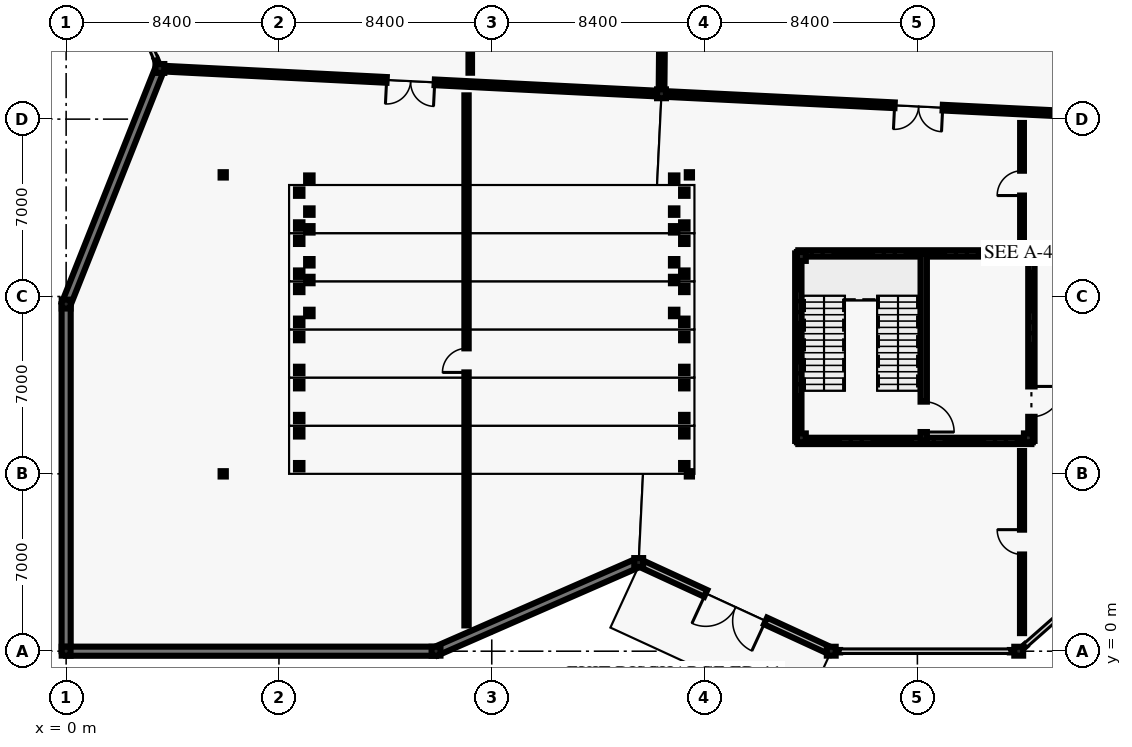
"""IFC4 building model, lengths in metres.
Left out: names, types, materials, properties, quantities, classifications, styles, units other than length and angle.
Written with IfcOpenShell. Run it as: python <this file> out.ifc"""

import sys

from ifc_helpers import new_model, si_unit, direction, frame, frame_2d, origin, origin_2d, place, context, subcontext, project, spatial, rectangle, i_section, extrude, element, fill, save


model = new_model("IFC4")
c1 = context("Model", 3, precision=1e-05, world=origin(), true_north=direction((0.0, 1.0)))
c2 = subcontext(c1, "Body", "Model", "MODEL_VIEW")
j1 = project(units=[si_unit("LENGTHUNIT", "METRE"), si_unit("PLANEANGLEUNIT", "RADIAN")], contexts=[c1])
p1 = place(None, origin())
s1 = spatial("IfcSite", under=j1, at=p1, CompositionType="ELEMENT")
p2 = place(p1, origin())
s2 = spatial("IfcBuilding", under=s1, at=p2, CompositionType="ELEMENT")
p3 = place(p2, origin())
s3 = spatial("IfcBuildingStorey", under=s2, at=p3, CompositionType="ELEMENT", Elevation=0.0)
for number, where, z_axis, x_axis in (
    (1, (0.0, 0.0, 0.0), (0.0, 0.0, 1.0), (1.0, 0.0, 0.0)),
    (2, (0.0, 13.7, 0.0), (0.0, 0.0, 1.0), (1.0, 0.0, 0.0)),
    (3, (3.7, 23.0, 0.0), (0.0, 0.0, 1.0), (1.0, 0.0, 0.0)),
    (4, (14.6, 0.0, 0.0), (0.0, 0.0, 1.0), (1.0, 0.0, 0.0)),
    (5, (22.6, 3.5, 0.0), (0.0, 0.0, 1.0), (1.0, 0.0, 0.0)),
    (6, (23.5, 22.0, 0.0), (0.0, 0.0, 1.0), (1.0, 0.0, 0.0)),
    (7, (30.2, 0.0, 0.0), (0.0, 0.0, 1.0), (1.0, 0.0, 0.0)),
    (8, (37.6, 0.0, 0.0), (0.0, 0.0, 1.0), (1.0, 0.0, 0.0)),
    (9, (29.02, 8.42, 0.0), (0.0, 0.0, 1.0), (1.0, 0.0, 0.0)),
    (10, (37.98, 8.42, 0.0), (0.0, 0.0, 1.0), (1.0, 0.0, 0.0)),
    (11, (37.98, 15.58, 0.0), (0.0, 0.0, 1.0), (1.0, 0.0, 0.0)),
    (12, (29.02, 15.58, 0.0), (0.0, 0.0, 1.0), (1.0, 0.0, 0.0)),
):
    element("IfcColumn", number, at=place(p3, frame(where, z_axis=z_axis, x_axis=x_axis)), inside=s3, PredefinedType="COLUMN", context=c2, shape_type="SweptSolid", body=[
        extrude(i_section(OverallWidth=0.35, OverallDepth=0.35, WebThickness=0.02, FlangeThickness=0.028, at=origin_2d()), origin(), (0.0, 0.0, 1.0), 5.4),
    ])
for number, where, z_axis, x_axis in (
    (13, (6.2, 7.0, 0.0), (0.0, 0.0, 1.0), (1.0, 0.0, 0.0)),
    (14, (24.6, 7.0, 0.0), (0.0, 0.0, 1.0), (1.0, 0.0, 0.0)),
    (15, (6.2, 18.8, 0.0), (0.0, 0.0, 1.0), (1.0, 0.0, 0.0)),
    (16, (24.6, 18.8, 0.0), (0.0, 0.0, 1.0), (1.0, 0.0, 0.0)),
):
    element("IfcColumn", number, at=place(p3, frame(where, z_axis=z_axis, x_axis=x_axis)), inside=s3, PredefinedType="COLUMN", context=c2, shape_type="SweptSolid", body=[
        extrude(i_section(OverallWidth=0.205, OverallDepth=0.21, WebThickness=0.009, FlangeThickness=0.014, FilletRadius=0.01, at=origin_2d()), origin(), (0.0, 0.0, 1.0), 5.4),
    ])
for number, where, z_axis, x_axis in (
    (17, (9.2, 7.3, 0.0), (0.0, 0.0, 1.0), (1.0, 0.0, 0.0)),
    (18, (9.2, 8.6, 0.0), (0.0, 0.0, 1.0), (1.0, 0.0, 0.0)),
    (19, (24.4, 7.3, 0.0), (0.0, 0.0, 1.0), (1.0, 0.0, 0.0)),
    (20, (24.4, 8.6, 0.0), (0.0, 0.0, 1.0), (1.0, 0.0, 0.0)),
):
    element("IfcColumn", number, at=place(p3, frame(where, z_axis=z_axis, x_axis=x_axis)), inside=s3, PredefinedType="COLUMN", context=c2, shape_type="SweptSolid", body=[
        extrude(i_section(OverallWidth=0.254, OverallDepth=0.254, WebThickness=0.009, FlangeThickness=0.014, FilletRadius=0.013, at=origin_2d()), origin(), (0.0, 0.0, 1.0), 0.255),
    ])
for number, where, z_axis, x_axis in (
    (21, (9.2, 9.2, 0.0), (0.0, 0.0, 1.0), (1.0, 0.0, 0.0)),
    (22, (9.2, 10.5, 0.0), (0.0, 0.0, 1.0), (1.0, 0.0, 0.0)),
    (23, (24.4, 9.2, 0.0), (0.0, 0.0, 1.0), (1.0, 0.0, 0.0)),
    (24, (24.4, 10.5, 0.0), (0.0, 0.0, 1.0), (1.0, 0.0, 0.0)),
):
    element("IfcColumn", number, at=place(p3, frame(where, z_axis=z_axis, x_axis=x_axis)), inside=s3, PredefinedType="COLUMN", context=c2, shape_type="SweptSolid", body=[
        extrude(i_section(OverallWidth=0.254, OverallDepth=0.254, WebThickness=0.009, FlangeThickness=0.014, FilletRadius=0.013, at=origin_2d()), origin(), (0.0, 0.0, 1.0), 0.675),
    ])
for number, where, z_axis, x_axis in (
    (25, (9.2, 11.1, 0.0), (0.0, 0.0, 1.0), (1.0, 0.0, 0.0)),
    (26, (9.2, 12.4, 0.0), (0.0, 0.0, 1.0), (1.0, 0.0, 0.0)),
    (27, (24.4, 11.1, 0.0), (0.0, 0.0, 1.0), (1.0, 0.0, 0.0)),
    (28, (24.4, 12.4, 0.0), (0.0, 0.0, 1.0), (1.0, 0.0, 0.0)),
):
    element("IfcColumn", number, at=place(p3, frame(where, z_axis=z_axis, x_axis=x_axis)), inside=s3, PredefinedType="COLUMN", context=c2, shape_type="SweptSolid", body=[
        extrude(i_section(OverallWidth=0.254, OverallDepth=0.254, WebThickness=0.009, FlangeThickness=0.014, FilletRadius=0.013, at=origin_2d()), origin(), (0.0, 0.0, 1.0), 1.095),
    ])
for number, where, z_axis, x_axis in (
    (29, (9.2, 13.0, 0.0), (0.0, 0.0, 1.0), (1.0, 0.0, 0.0)),
    (30, (9.2, 14.3, 0.0), (0.0, 0.0, 1.0), (1.0, 0.0, 0.0)),
    (31, (24.4, 13.0, 0.0), (0.0, 0.0, 1.0), (1.0, 0.0, 0.0)),
    (32, (24.4, 14.3, 0.0), (0.0, 0.0, 1.0), (1.0, 0.0, 0.0)),
):
    element("IfcColumn", number, at=place(p3, frame(where, z_axis=z_axis, x_axis=x_axis)), inside=s3, PredefinedType="COLUMN", context=c2, shape_type="SweptSolid", body=[
        extrude(i_section(OverallWidth=0.254, OverallDepth=0.254, WebThickness=0.009, FlangeThickness=0.014, FilletRadius=0.013, at=origin_2d()), origin(), (0.0, 0.0, 1.0), 1.515),
    ])
for number, where, z_axis, x_axis in (
    (33, (9.2, 14.9, 0.0), (0.0, 0.0, 1.0), (1.0, 0.0, 0.0)),
    (34, (9.2, 16.2, 0.0), (0.0, 0.0, 1.0), (1.0, 0.0, 0.0)),
    (35, (24.4, 14.9, 0.0), (0.0, 0.0, 1.0), (1.0, 0.0, 0.0)),
    (36, (24.4, 16.2, 0.0), (0.0, 0.0, 1.0), (1.0, 0.0, 0.0)),
):
    element("IfcColumn", number, at=place(p3, frame(where, z_axis=z_axis, x_axis=x_axis)), inside=s3, PredefinedType="COLUMN", context=c2, shape_type="SweptSolid", body=[
        extrude(i_section(OverallWidth=0.254, OverallDepth=0.254, WebThickness=0.009, FlangeThickness=0.014, FilletRadius=0.013, at=origin_2d()), origin(), (0.0, 0.0, 1.0), 1.935),
    ])
for number, where, z_axis, x_axis in (
    (37, (9.2, 16.8, 0.0), (0.0, 0.0, 1.0), (1.0, 0.0, 0.0)),
    (38, (9.2, 18.1, 0.0), (0.0, 0.0, 1.0), (1.0, 0.0, 0.0)),
    (39, (24.4, 16.8, 0.0), (0.0, 0.0, 1.0), (1.0, 0.0, 0.0)),
    (40, (24.4, 18.1, 0.0), (0.0, 0.0, 1.0), (1.0, 0.0, 0.0)),
):
    element("IfcColumn", number, at=place(p3, frame(where, z_axis=z_axis, x_axis=x_axis)), inside=s3, PredefinedType="COLUMN", context=c2, shape_type="SweptSolid", body=[
        extrude(i_section(OverallWidth=0.254, OverallDepth=0.254, WebThickness=0.009, FlangeThickness=0.014, FilletRadius=0.013, at=origin_2d()), origin(), (0.0, 0.0, 1.0), 2.355),
    ])
for number, where, z_axis, x_axis in (
    (41, (9.6, 13.35, 0.0), (0.0, 0.0, 1.0), (1.0, 0.0, 0.0)),
    (42, (9.6, 14.65, 0.0), (0.0, 0.0, 1.0), (1.0, 0.0, 0.0)),
    (43, (24.0, 13.35, 0.0), (0.0, 0.0, 1.0), (1.0, 0.0, 0.0)),
    (44, (24.0, 14.65, 0.0), (0.0, 0.0, 1.0), (1.0, 0.0, 0.0)),
    (45, (9.6, 15.35, 0.0), (0.0, 0.0, 1.0), (1.0, 0.0, 0.0)),
    (46, (9.6, 16.65, 0.0), (0.0, 0.0, 1.0), (1.0, 0.0, 0.0)),
    (47, (24.0, 15.35, 0.0), (0.0, 0.0, 1.0), (1.0, 0.0, 0.0)),
    (48, (24.0, 16.65, 0.0), (0.0, 0.0, 1.0), (1.0, 0.0, 0.0)),
    (49, (9.6, 17.35, 0.0), (0.0, 0.0, 1.0), (1.0, 0.0, 0.0)),
    (50, (9.6, 18.65, 0.0), (0.0, 0.0, 1.0), (1.0, 0.0, 0.0)),
    (51, (24.0, 17.35, 0.0), (0.0, 0.0, 1.0), (1.0, 0.0, 0.0)),
    (52, (24.0, 18.65, 0.0), (0.0, 0.0, 1.0), (1.0, 0.0, 0.0)),
):
    element("IfcColumn", number, at=place(p3, frame(where, z_axis=z_axis, x_axis=x_axis)), inside=s3, PredefinedType="COLUMN", context=c2, shape_type="SweptSolid", body=[
        extrude(i_section(OverallWidth=0.254, OverallDepth=0.254, WebThickness=0.009, FlangeThickness=0.014, FilletRadius=0.013, at=origin_2d()), origin(), (0.0, 0.0, 1.0), 5.4),
    ])
p4 = place(p3, frame((0.0, 13.7, 0.0), z_axis=(0.0, 0.0, 1.0), x_axis=(0.36968498985, 0.929157149399, 0.0)))
e53 = element("IfcWall", 53, at=p4, inside=s3, PredefinedType="SOLIDWALL", context=c2, shape_type="SweptSolid", body=[
    extrude(rectangle(XDim=9.949, YDim=0.36, at=frame_2d((4.975, 0.0))), origin(), (0.0, 0.0, 1.0), 4.22),
])
p5 = place(p3, frame((0.0, 0.0, 0.0), z_axis=(0.0, 0.0, 1.0), x_axis=(0.0, 1.0, 0.0)))
e54 = element("IfcWall", 54, at=p5, inside=s3, PredefinedType="SOLIDWALL", context=c2, shape_type="SweptSolid", body=[
    extrude(rectangle(XDim=13.7, YDim=0.36, at=frame_2d((6.85, 0.0))), origin(), (0.0, 0.0, 1.0), 4.22),
])
p6 = place(p3, frame((14.6, 0.0, 0.0), z_axis=(0.0, 0.0, 1.0), x_axis=(-1.0, 0.0, 0.0)))
e55 = element("IfcWall", 55, at=p6, inside=s3, PredefinedType="SOLIDWALL", context=c2, shape_type="SweptSolid", body=[
    extrude(rectangle(XDim=14.6, YDim=0.36, at=frame_2d((7.3, 0.0))), origin(), (0.0, 0.0, 1.0), 4.22),
])
p7 = place(p3, frame((22.545, 3.476, 0.0), z_axis=(0.0, 0.0, 1.0), x_axis=(-0.916148288852, -0.400839510069, 0.0)))
e56 = element("IfcWall", 56, at=p7, inside=s3, PredefinedType="SOLIDWALL", context=c2, shape_type="SweptSolid", body=[
    extrude(rectangle(XDim=8.672, YDim=0.36, at=frame_2d((4.336, 0.0))), origin(), (0.0, 0.0, 1.0), 4.22),
])
p8 = place(p3, frame((30.2, 0.0, 0.0), z_axis=(0.0, 0.0, 1.0), x_axis=(-0.90830827854, 0.418301411827, 0.0)))
e57 = element("IfcWall", 57, at=p8, inside=s3, PredefinedType="SOLIDWALL", context=c2, shape_type="SweptSolid", body=[
    extrude(rectangle(XDim=8.308, YDim=0.29, at=frame_2d((4.154, 0.0))), origin(), (0.0, 0.0, 1.0), 4.22),
])
p9 = place(p8, frame((2.854, 0.0, 0.0)))
e58 = element("IfcOpeningElement", 58, at=p9, cuts=e57, PredefinedType="OPENING", context=c2, shape_type="SweptSolid", body=[
    extrude(rectangle(XDim=2.6, YDim=2.55, at=frame_2d((1.3, 1.275))), frame((0.0, 0.155, 0.0), z_axis=(0.0, -1.0, 0.0), x_axis=(1.0, 0.0, 0.0)), (0.0, 0.0, 1.0), 0.31),
])
for number, where, z_axis, x_axis in (
    (59, (37.558, 0.0, 0.0), (0.0, 0.0, 1.0), (-1.0, 0.0, 0.0)),
    (60, (30.55, 0.0, 0.0), (0.0, 0.0, 1.0), (-1.0, 0.0, 0.0)),
):
    element("IfcWall", number, at=place(p3, frame(where, z_axis=z_axis, x_axis=x_axis)), inside=s3, PredefinedType="SOLIDWALL", context=c2, shape_type="SweptSolid", body=[
        extrude(rectangle(XDim=0.308, YDim=0.095, at=frame_2d((0.154, 0.0))), origin(), (0.0, 0.0, 1.0), 4.22),
    ])
p10 = place(p3, frame((37.863, 0.231, 0.0), z_axis=(0.0, 0.0, 1.0), x_axis=(-0.751296149946, -0.659965222627, 0.0)))
e61 = element("IfcWall", 61, at=p10, inside=s3, PredefinedType="SOLIDWALL", context=c2, shape_type="SweptSolid", body=[
    extrude(rectangle(XDim=0.307, YDim=0.095, at=frame_2d((0.154, 0.0))), origin(), (0.0, 0.0, 1.0), 4.22),
])
p11 = place(p3, frame((3.661, 23.094, 0.0), z_axis=(0.0, 0.0, 1.0), x_axis=(-0.38894215718, 0.921262176782, 0.0)))
e62 = element("IfcWall", 62, at=p11, inside=s3, PredefinedType="SOLIDWALL", context=c2, shape_type="SweptSolid", body=[
    extrude(rectangle(XDim=0.308, YDim=0.095, at=frame_2d((0.154, 0.0))), origin(), (0.0, 0.0, 1.0), 4.22),
])
p12 = place(p3, frame((23.5, 22.0, 0.0), z_axis=(0.0, 0.0, 1.0), x_axis=(-0.99872706092, 0.050440636263, 0.0)))
e63 = element("IfcWall", 63, at=p12, inside=s3, PredefinedType="SOLIDWALL", context=c2, shape_type="SweptSolid", body=[
    extrude(rectangle(XDim=19.825, YDim=0.225, at=frame_2d((9.913, 0.0))), origin(), (0.0, 0.0, 1.0), 4.62),
])
p13 = place(p12, frame((8.963, 0.0, 0.0)))
e64 = element("IfcOpeningElement", 64, at=p13, cuts=e63, PredefinedType="OPENING", context=c2, shape_type="SweptSolid", body=[
    extrude(rectangle(XDim=1.9, YDim=2.35, at=frame_2d((0.95, 1.175))), frame((0.0, 0.123, 0.0), z_axis=(0.0, -1.0, 0.0), x_axis=(1.0, 0.0, 0.0)), (0.0, 0.0, 1.0), 0.245),
])
p14 = place(p3, frame((43.8, 21.0, 0.0), z_axis=(0.0, 0.0, 1.0), x_axis=(-0.998788882418, 0.049201304434, 0.0)))
e65 = element("IfcWall", 65, at=p14, inside=s3, PredefinedType="SOLIDWALL", context=c2, shape_type="SweptSolid", body=[
    extrude(rectangle(XDim=20.325, YDim=0.225, at=frame_2d((10.162, 0.0))), origin(), (0.0, 0.0, 1.0), 4.62),
])
p15 = place(p14, frame((9.212, 0.0, 0.0)))
e66 = element("IfcOpeningElement", 66, at=p15, cuts=e65, PredefinedType="OPENING", context=c2, shape_type="SweptSolid", body=[
    extrude(rectangle(XDim=1.9, YDim=2.35, at=frame_2d((0.95, 1.175))), frame((0.0, 0.123, 0.0), z_axis=(0.0, -1.0, 0.0), x_axis=(1.0, 0.0, 0.0)), (0.0, 0.0, 1.0), 0.245),
])
p16 = place(p3, frame((23.5, 22.0, 0.0), z_axis=(0.0, 0.0, 1.0), x_axis=(0.009521052802, 0.99995467375, 0.0)))
e67 = element("IfcWall", 67, at=p16, inside=s3, PredefinedType="SOLIDWALL", context=c2, shape_type="SweptSolid", body=[
    extrude(rectangle(XDim=21.001, YDim=0.225, at=frame_2d((10.5, 0.0))), origin(), (0.0, 0.0, 1.0), 4.62),
])
p17 = place(p16, frame((9.575, 0.0, 0.0)))
e68 = element("IfcOpeningElement", 68, at=p17, cuts=e67, PredefinedType="OPENING", context=c2, shape_type="SweptSolid", body=[
    extrude(rectangle(XDim=1.85, YDim=2.4, at=frame_2d((0.925, 1.2))), frame((0.0, 0.123, 0.0), z_axis=(0.0, -1.0, 0.0), x_axis=(1.0, 0.0, 0.0)), (0.0, 0.0, 1.0), 0.245),
])
p18 = place(p3, frame((15.804, 1.018, 0.0), z_axis=(0.0, 0.0, 1.0), x_axis=(0.0, 1.0, 0.0)))
e69 = element("IfcWall", 69, at=p18, inside=s3, PredefinedType="PARTITIONING", context=c2, shape_type="SweptSolid", body=[
    extrude(rectangle(XDim=20.92, YDim=0.17, at=frame_2d((10.46, 0.0))), origin(), (0.0, 0.0, 1.0), 3.92),
])
p19 = place(p18, frame((9.985, 0.0, 0.0)))
e70 = element("IfcOpeningElement", 70, at=p19, cuts=e69, PredefinedType="OPENING", context=c2, shape_type="SweptSolid", body=[
    extrude(rectangle(XDim=0.95, YDim=2.15, at=frame_2d((0.475, 1.075))), frame((0.0, 0.095, 0.0), z_axis=(0.0, -1.0, 0.0), x_axis=(1.0, 0.0, 0.0)), (0.0, 0.0, 1.0), 0.19),
])
p20 = place(p3, frame((37.73, 0.714, 0.0), z_axis=(0.0, 0.0, 1.0), x_axis=(0.0, 1.0, 0.0)))
e71 = element("IfcWall", 71, at=p20, inside=s3, PredefinedType="PARTITIONING", context=c2, shape_type="SweptSolid", body=[
    extrude(rectangle(XDim=7.186, YDim=0.16, at=frame_2d((3.593, 0.0))), origin(), (0.0, 0.0, 1.0), 3.92),
])
p21 = place(p20, frame((3.103, 0.0, 0.0)))
e72 = element("IfcOpeningElement", 72, at=p21, cuts=e71, PredefinedType="OPENING", context=c2, shape_type="SweptSolid", body=[
    extrude(rectangle(XDim=0.98, YDim=2.15, at=frame_2d((0.49, 1.075))), frame((0.0, 0.09, 0.0), z_axis=(0.0, -1.0, 0.0), x_axis=(1.0, 0.0, 0.0)), (0.0, 0.0, 1.0), 0.18),
])
p22 = place(p3, frame((37.73, 16.1, 0.0), z_axis=(0.0, 0.0, 1.0), x_axis=(0.0, 1.0, 0.0)))
e73 = element("IfcWall", 73, at=p22, inside=s3, PredefinedType="PARTITIONING", context=c2, shape_type="SweptSolid", body=[
    extrude(rectangle(XDim=4.748, YDim=0.15, at=frame_2d((2.374, 0.0))), origin(), (0.0, 0.0, 1.0), 3.92),
])
p23 = place(p22, frame((1.884, 0.0, 0.0)))
e74 = element("IfcOpeningElement", 74, at=p23, cuts=e73, PredefinedType="OPENING", context=c2, shape_type="SweptSolid", body=[
    extrude(rectangle(XDim=0.98, YDim=2.15, at=frame_2d((0.49, 1.075))), frame((0.0, 0.085, 0.0), z_axis=(0.0, -1.0, 0.0), x_axis=(1.0, 0.0, 0.0)), (0.0, 0.0, 1.0), 0.17),
])
p24 = place(p3, frame((15.951, 22.832, 0.0), z_axis=(0.0, 0.0, 1.0), x_axis=(0.0, 1.0, 0.0)))
e75 = element("IfcWall", 75, at=p24, inside=s3, PredefinedType="PARTITIONING", context=c2, shape_type="SweptSolid", body=[
    extrude(rectangle(XDim=5.568, YDim=0.14, at=frame_2d((2.784, 0.0))), origin(), (0.0, 0.0, 1.0), 3.92),
])
p25 = place(p24, frame((2.259, 0.0, 0.0)))
e76 = element("IfcOpeningElement", 76, at=p25, cuts=e75, PredefinedType="OPENING", context=c2, shape_type="SweptSolid", body=[
    extrude(rectangle(XDim=1.05, YDim=2.2, at=frame_2d((0.525, 1.1))), frame((0.0, 0.08, 0.0), z_axis=(0.0, -1.0, 0.0), x_axis=(1.0, 0.0, 0.0)), (0.0, 0.0, 1.0), 0.16),
])
p26 = place(p3, frame((28.9, 8.3, 0.0), z_axis=(0.0, 0.0, 1.0), x_axis=(0.0, 1.0, 0.0)))
e77 = element("IfcWall", 77, at=p26, inside=s3, PredefinedType="SHEAR", context=c2, shape_type="SweptSolid", body=[
    extrude(rectangle(XDim=7.4, YDim=0.25, at=frame_2d((3.7, 0.0))), origin(), (0.0, 0.0, 1.0), 5.16),
])
for number, where, z_axis, x_axis in (
    (78, (28.9, 15.7, 0.0), (0.0, 0.0, 1.0), (1.0, 0.0, 0.0)),
    (79, (38.1, 8.3, 0.0), (0.0, 0.0, 1.0), (-1.0, 0.0, 0.0)),
):
    element("IfcWall", number, at=place(p3, frame(where, z_axis=z_axis, x_axis=x_axis)), inside=s3, PredefinedType="SHEAR", context=c2, shape_type="SweptSolid", body=[
        extrude(rectangle(XDim=9.2, YDim=0.25, at=frame_2d((4.6, 0.0))), origin(), (0.0, 0.0, 1.0), 5.16),
    ])
p27 = place(p3, frame((38.1, 15.7, 0.0), z_axis=(0.0, 0.0, 1.0), x_axis=(0.0, -1.0, 0.0)))
e80 = element("IfcWall", 80, at=p27, inside=s3, PredefinedType="SHEAR", context=c2, shape_type="SweptSolid", body=[
    extrude(rectangle(XDim=7.4, YDim=0.25, at=frame_2d((3.7, 0.0))), origin(), (0.0, 0.0, 1.0), 5.16),
])
p28 = place(p27, frame((5.25, 0.0, 0.0)))
e81 = element("IfcOpeningElement", 81, at=p28, cuts=e80, PredefinedType="OPENING", context=c2, shape_type="SweptSolid", body=[
    extrude(rectangle(XDim=1.2, YDim=2.2, at=frame_2d((0.6, 1.1))), frame((0.0, 0.135, 0.0), z_axis=(0.0, -1.0, 0.0), x_axis=(1.0, 0.0, 0.0)), (0.0, 0.0, 1.0), 0.27),
])
p29 = place(p3, frame((33.85, 15.7, 0.0), z_axis=(0.0, 0.0, 1.0), x_axis=(0.0, -1.0, 0.0)))
e82 = element("IfcWall", 82, at=p29, inside=s3, PredefinedType="SHEAR", context=c2, shape_type="SweptSolid", body=[
    extrude(rectangle(XDim=7.4, YDim=0.25, at=frame_2d((3.7, 0.0))), origin(), (0.0, 0.0, 1.0), 5.16),
])
p30 = place(p29, frame((5.85, 0.0, 0.0)))
e83 = element("IfcOpeningElement", 83, at=p30, cuts=e82, PredefinedType="OPENING", context=c2, shape_type="SweptSolid", body=[
    extrude(rectangle(XDim=1.2, YDim=2.2, at=frame_2d((0.6, 1.1))), frame((0.0, 0.135, 0.0), z_axis=(0.0, -1.0, 0.0), x_axis=(1.0, 0.0, 0.0)), (0.0, 0.0, 1.0), 0.27),
])
p31 = place(p9, origin())
e84 = element("IfcDoor", 84, at=p31, inside=s3, OperationType="DOUBLE_DOOR_SINGLE_SWING", PredefinedType="DOOR", context=c2, shape_type="SweptSolid", body=[
    extrude(rectangle(XDim=2.6, YDim=2.55, at=frame_2d((1.3, 1.275))), frame((0.0, 0.025, 0.0), z_axis=(0.0, -1.0, 0.0), x_axis=(1.0, 0.0, 0.0)), (0.0, 0.0, 1.0), 0.05),
])
fill(e58, e84)
p32 = place(p13, origin())
e85 = element("IfcDoor", 85, at=p32, inside=s3, OperationType="DOUBLE_DOOR_SINGLE_SWING", PredefinedType="DOOR", context=c2, shape_type="SweptSolid", body=[
    extrude(rectangle(XDim=1.9, YDim=2.35, at=frame_2d((0.95, 1.175))), frame((0.0, 0.025, 0.0), z_axis=(0.0, -1.0, 0.0), x_axis=(1.0, 0.0, 0.0)), (0.0, 0.0, 1.0), 0.05),
])
fill(e64, e85)
p33 = place(p15, origin())
e86 = element("IfcDoor", 86, at=p33, inside=s3, OperationType="DOUBLE_DOOR_SINGLE_SWING", PredefinedType="DOOR", context=c2, shape_type="SweptSolid", body=[
    extrude(rectangle(XDim=1.9, YDim=2.35, at=frame_2d((0.95, 1.175))), frame((0.0, 0.025, 0.0), z_axis=(0.0, -1.0, 0.0), x_axis=(1.0, 0.0, 0.0)), (0.0, 0.0, 1.0), 0.05),
])
fill(e66, e86)
p34 = place(p19, origin())
e87 = element("IfcDoor", 87, at=p34, inside=s3, OperationType="SINGLE_SWING_LEFT", PredefinedType="DOOR", context=c2, shape_type="SweptSolid", body=[
    extrude(rectangle(XDim=0.95, YDim=2.15, at=frame_2d((0.475, 1.075))), frame((0.0, 0.025, 0.0), z_axis=(0.0, -1.0, 0.0), x_axis=(1.0, 0.0, 0.0)), (0.0, 0.0, 1.0), 0.05),
])
fill(e70, e87)
p35 = place(p21, origin())
e88 = element("IfcDoor", 88, at=p35, inside=s3, OperationType="SINGLE_SWING_RIGHT", PredefinedType="DOOR", context=c2, shape_type="SweptSolid", body=[
    extrude(rectangle(XDim=0.98, YDim=2.15, at=frame_2d((0.49, 1.075))), frame((0.0, 0.025, 0.0), z_axis=(0.0, -1.0, 0.0), x_axis=(1.0, 0.0, 0.0)), (0.0, 0.0, 1.0), 0.05),
])
fill(e72, e88)
p36 = place(p23, origin())
e89 = element("IfcDoor", 89, at=p36, inside=s3, OperationType="SINGLE_SWING_LEFT", PredefinedType="DOOR", context=c2, shape_type="SweptSolid", body=[
    extrude(rectangle(XDim=0.98, YDim=2.15, at=frame_2d((0.49, 1.075))), frame((0.0, 0.025, 0.0), z_axis=(0.0, -1.0, 0.0), x_axis=(1.0, 0.0, 0.0)), (0.0, 0.0, 1.0), 0.05),
])
fill(e74, e89)
p37 = place(p28, origin())
e90 = element("IfcDoor", 90, at=p37, inside=s3, OperationType="SINGLE_SWING_LEFT", PredefinedType="DOOR", context=c2, shape_type="SweptSolid", body=[
    extrude(rectangle(XDim=1.2, YDim=2.2, at=frame_2d((0.6, 1.1))), frame((0.0, 0.025, 0.0), z_axis=(0.0, -1.0, 0.0), x_axis=(1.0, 0.0, 0.0)), (0.0, 0.0, 1.0), 0.05),
])
fill(e81, e90)
p38 = place(p30, origin())
e91 = element("IfcDoor", 91, at=p38, inside=s3, OperationType="SINGLE_SWING_RIGHT", PredefinedType="DOOR", context=c2, shape_type="SweptSolid", body=[
    extrude(rectangle(XDim=1.2, YDim=2.2, at=frame_2d((0.6, 1.1))), frame((0.0, 0.025, 0.0), z_axis=(0.0, -1.0, 0.0), x_axis=(1.0, 0.0, 0.0)), (0.0, 0.0, 1.0), 0.05),
])
fill(e83, e91)
save(model, sys.argv[1])
